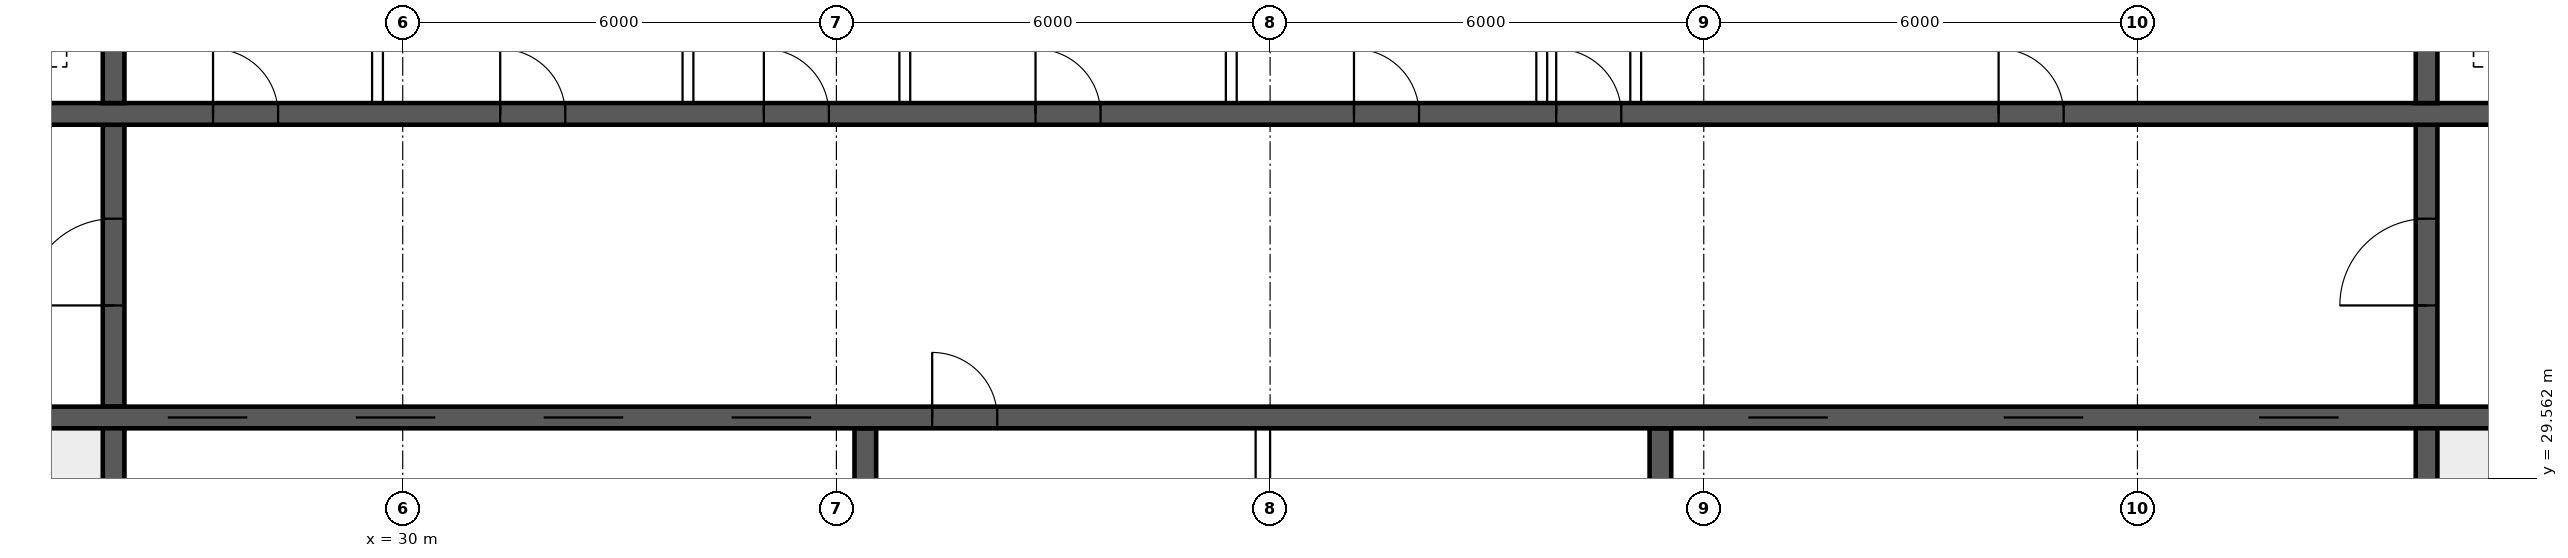
"""IFC4 building model, lengths in metres.
Left out: names, types, materials, properties, quantities, classifications, styles, units other than length and angle.
Written with IfcOpenShell. Run it as: python <this file> out.ifc"""

import sys

from ifc_helpers import new_model, si_unit, direction, frame, frame_2d, origin, place, context, subcontext, project, spatial, rectangle, extrude, element, fill, save


model = new_model("IFC4")
c1 = context("Model", 3, precision=1e-05, world=origin(), true_north=direction((0.0, 1.0)))
c2 = subcontext(c1, "Body", "Model", "MODEL_VIEW")
j1 = project(units=[si_unit("LENGTHUNIT", "METRE"), si_unit("PLANEANGLEUNIT", "RADIAN")], contexts=[c1])
p1 = place(None, origin())
s1 = spatial("IfcSite", under=j1, at=p1, CompositionType="ELEMENT")
p2 = place(p1, origin())
s2 = spatial("IfcBuilding", under=s1, at=p2, CompositionType="ELEMENT")
p3 = place(p2, frame((0.0, 0.0, 178.6)))
s3 = spatial("IfcBuildingStorey", under=s2, at=p3, CompositionType="ELEMENT", Elevation=178.6)
p4 = place(p3, frame((18.425, 30.4, 0.0), z_axis=(0.0, 0.0, 1.0), x_axis=(1.0, 0.0, 0.0)))
e1 = element("IfcWall", 1, at=p4, inside=s3, PredefinedType="SHEAR", context=c2, shape_type="SweptSolid", body=[
    extrude(rectangle(XDim=47.15, YDim=0.3, at=frame_2d((23.575, 0.0))), origin(), (0.0, 0.0, 1.0), 3.75),
])
p5 = place(p4, frame((0.4, 0.0, 0.0)))
e2 = element("IfcOpeningElement", 2, at=p5, cuts=e1, PredefinedType="OPENING", context=c2, shape_type="SweptSolid", body=[
    extrude(rectangle(XDim=1.0, YDim=2.1, at=frame_2d((0.5, 1.05))), frame((0.0, 0.16, 0.0), z_axis=(0.0, -1.0, 0.0), x_axis=(1.0, 0.0, 0.0)), (0.0, 0.0, 1.0), 0.32),
])
p6 = place(p4, frame((45.75, 0.0, 0.0)))
e3 = element("IfcOpeningElement", 3, at=p6, cuts=e1, PredefinedType="OPENING", context=c2, shape_type="SweptSolid", body=[
    extrude(rectangle(XDim=1.0, YDim=2.1, at=frame_2d((0.5, 1.05))), frame((0.0, 0.16, 0.0), z_axis=(0.0, -1.0, 0.0), x_axis=(1.0, 0.0, 0.0)), (0.0, 0.0, 1.0), 0.32),
])
p7 = place(p4, frame((8.325, 0.0, 0.0)))
e4 = element("IfcOpeningElement", 4, at=p7, cuts=e1, PredefinedType="OPENING", context=c2, shape_type="SweptSolid", body=[
    extrude(rectangle(XDim=1.1, YDim=2.1, at=frame_2d((0.55, 1.05))), frame((0.0, 0.16, 0.0), z_axis=(0.0, -1.0, 0.0), x_axis=(1.0, 0.0, 0.0)), (0.0, 0.0, 1.0), 0.32),
])
p8 = place(p4, frame((10.925, 0.0, 0.0)))
e5 = element("IfcOpeningElement", 5, at=p8, cuts=e1, PredefinedType="OPENING", context=c2, shape_type="SweptSolid", body=[
    extrude(rectangle(XDim=1.1, YDim=2.1, at=frame_2d((0.55, 1.05))), frame((0.0, 0.16, 0.0), z_axis=(0.0, -1.0, 0.0), x_axis=(1.0, 0.0, 0.0)), (0.0, 0.0, 1.0), 0.32),
])
p9 = place(p4, frame((13.525, 0.0, 0.0)))
e6 = element("IfcOpeningElement", 6, at=p9, cuts=e1, PredefinedType="OPENING", context=c2, shape_type="SweptSolid", body=[
    extrude(rectangle(XDim=1.1, YDim=2.1, at=frame_2d((0.55, 1.05))), frame((0.0, 0.16, 0.0), z_axis=(0.0, -1.0, 0.0), x_axis=(1.0, 0.0, 0.0)), (0.0, 0.0, 1.0), 0.32),
])
p10 = place(p4, frame((16.125, 0.0, 0.0)))
e7 = element("IfcOpeningElement", 7, at=p10, cuts=e1, PredefinedType="OPENING", context=c2, shape_type="SweptSolid", body=[
    extrude(rectangle(XDim=1.1, YDim=2.1, at=frame_2d((0.55, 1.05))), frame((0.0, 0.16, 0.0), z_axis=(0.0, -1.0, 0.0), x_axis=(1.0, 0.0, 0.0)), (0.0, 0.0, 1.0), 0.32),
])
p11 = place(p4, frame((18.9, 0.0, 0.0)))
e8 = element("IfcOpeningElement", 8, at=p11, cuts=e1, PredefinedType="OPENING", context=c2, shape_type="SweptSolid", body=[
    extrude(rectangle(XDim=0.9, YDim=2.1, at=frame_2d((0.45, 1.05))), frame((0.0, 0.16, 0.0), z_axis=(0.0, -1.0, 0.0), x_axis=(1.0, 0.0, 0.0)), (0.0, 0.0, 1.0), 0.32),
])
p12 = place(p4, frame((30.192, 0.0, 0.0)))
e9 = element("IfcOpeningElement", 9, at=p12, cuts=e1, PredefinedType="OPENING", context=c2, shape_type="SweptSolid", body=[
    extrude(rectangle(XDim=1.1, YDim=2.1, at=frame_2d((0.55, 1.05))), frame((0.0, 0.16, 0.0), z_axis=(0.0, -1.0, 0.0), x_axis=(1.0, 0.0, 0.0)), (0.0, 0.0, 1.0), 0.32),
])
p13 = place(p4, frame((33.725, 0.0, 0.0)))
e10 = element("IfcOpeningElement", 10, at=p13, cuts=e1, PredefinedType="OPENING", context=c2, shape_type="SweptSolid", body=[
    extrude(rectangle(XDim=1.1, YDim=2.1, at=frame_2d((0.55, 1.05))), frame((0.0, 0.16, 0.0), z_axis=(0.0, -1.0, 0.0), x_axis=(1.0, 0.0, 0.0)), (0.0, 0.0, 1.0), 0.32),
])
p14 = place(p4, frame((37.258, 0.0, 0.0)))
e11 = element("IfcOpeningElement", 11, at=p14, cuts=e1, PredefinedType="OPENING", context=c2, shape_type="SweptSolid", body=[
    extrude(rectangle(XDim=1.1, YDim=2.1, at=frame_2d((0.55, 1.05))), frame((0.0, 0.16, 0.0), z_axis=(0.0, -1.0, 0.0), x_axis=(1.0, 0.0, 0.0)), (0.0, 0.0, 1.0), 0.32),
])
p15 = place(p3, frame((18.425, 34.6, 0.0), z_axis=(0.0, 0.0, 1.0), x_axis=(1.0, 0.0, 0.0)))
e12 = element("IfcWall", 12, at=p15, inside=s3, PredefinedType="SHEAR", context=c2, shape_type="SweptSolid", body=[
    extrude(rectangle(XDim=47.15, YDim=0.3, at=frame_2d((23.575, 0.0))), origin(), (0.0, 0.0, 1.0), 3.75),
])
p16 = place(p15, frame((0.9, 0.0, 0.0)))
e13 = element("IfcOpeningElement", 13, at=p16, cuts=e12, PredefinedType="OPENING", context=c2, shape_type="SweptSolid", body=[
    extrude(rectangle(XDim=1.1, YDim=2.1, at=frame_2d((0.55, 1.05))), frame((0.0, 0.16, 0.0), z_axis=(0.0, -1.0, 0.0), x_axis=(1.0, 0.0, 0.0)), (0.0, 0.0, 1.0), 0.32),
])
p17 = place(p15, frame((45.15, 0.0, 0.0)))
e14 = element("IfcOpeningElement", 14, at=p17, cuts=e12, PredefinedType="OPENING", context=c2, shape_type="SweptSolid", body=[
    extrude(rectangle(XDim=1.1, YDim=2.1, at=frame_2d((0.55, 1.05))), frame((0.0, 0.16, 0.0), z_axis=(0.0, -1.0, 0.0), x_axis=(1.0, 0.0, 0.0)), (0.0, 0.0, 1.0), 0.32),
])
p18 = place(p15, frame((4.175, 0.0, 0.0)))
e15 = element("IfcOpeningElement", 15, at=p18, cuts=e12, PredefinedType="OPENING", context=c2, shape_type="SweptSolid", body=[
    extrude(rectangle(XDim=0.9, YDim=2.1, at=frame_2d((0.45, 1.05))), frame((0.0, 0.16, 0.0), z_axis=(0.0, -1.0, 0.0), x_axis=(1.0, 0.0, 0.0)), (0.0, 0.0, 1.0), 0.32),
])
p19 = place(p15, frame((42.075, 0.0, 0.0)))
e16 = element("IfcOpeningElement", 16, at=p19, cuts=e12, PredefinedType="OPENING", context=c2, shape_type="SweptSolid", body=[
    extrude(rectangle(XDim=0.9, YDim=2.1, at=frame_2d((0.45, 1.05))), frame((0.0, 0.16, 0.0), z_axis=(0.0, -1.0, 0.0), x_axis=(1.0, 0.0, 0.0)), (0.0, 0.0, 1.0), 0.32),
])
p20 = place(p15, frame((8.95, 0.0, 0.0)))
e17 = element("IfcOpeningElement", 17, at=p20, cuts=e12, PredefinedType="OPENING", context=c2, shape_type="SweptSolid", body=[
    extrude(rectangle(XDim=0.9, YDim=2.1, at=frame_2d((0.45, 1.05))), frame((0.0, 0.16, 0.0), z_axis=(0.0, -1.0, 0.0), x_axis=(1.0, 0.0, 0.0)), (0.0, 0.0, 1.0), 0.32),
])
p21 = place(p15, frame((12.924, 0.0, 0.0)))
e18 = element("IfcOpeningElement", 18, at=p21, cuts=e12, PredefinedType="OPENING", context=c2, shape_type="SweptSolid", body=[
    extrude(rectangle(XDim=0.9, YDim=2.1, at=frame_2d((0.45, 1.05))), frame((0.0, 0.16, 0.0), z_axis=(0.0, -1.0, 0.0), x_axis=(1.0, 0.0, 0.0)), (0.0, 0.0, 1.0), 0.32),
])
p22 = place(p15, frame((16.571, 0.0, 0.0)))
e19 = element("IfcOpeningElement", 19, at=p22, cuts=e12, PredefinedType="OPENING", context=c2, shape_type="SweptSolid", body=[
    extrude(rectangle(XDim=0.9, YDim=2.1, at=frame_2d((0.45, 1.05))), frame((0.0, 0.16, 0.0), z_axis=(0.0, -1.0, 0.0), x_axis=(1.0, 0.0, 0.0)), (0.0, 0.0, 1.0), 0.32),
])
p23 = place(p15, frame((20.33, 0.0, 0.0)))
e20 = element("IfcOpeningElement", 20, at=p23, cuts=e12, PredefinedType="OPENING", context=c2, shape_type="SweptSolid", body=[
    extrude(rectangle(XDim=0.9, YDim=2.1, at=frame_2d((0.45, 1.05))), frame((0.0, 0.16, 0.0), z_axis=(0.0, -1.0, 0.0), x_axis=(1.0, 0.0, 0.0)), (0.0, 0.0, 1.0), 0.32),
])
p24 = place(p15, frame((24.736, 0.0, 0.0)))
e21 = element("IfcOpeningElement", 21, at=p24, cuts=e12, PredefinedType="OPENING", context=c2, shape_type="SweptSolid", body=[
    extrude(rectangle(XDim=0.9, YDim=2.1, at=frame_2d((0.45, 1.05))), frame((0.0, 0.16, 0.0), z_axis=(0.0, -1.0, 0.0), x_axis=(1.0, 0.0, 0.0)), (0.0, 0.0, 1.0), 0.32),
])
p25 = place(p15, frame((27.533, 0.0, 0.0)))
e22 = element("IfcOpeningElement", 22, at=p25, cuts=e12, PredefinedType="OPENING", context=c2, shape_type="SweptSolid", body=[
    extrude(rectangle(XDim=0.9, YDim=2.1, at=frame_2d((0.45, 1.05))), frame((0.0, 0.16, 0.0), z_axis=(0.0, -1.0, 0.0), x_axis=(1.0, 0.0, 0.0)), (0.0, 0.0, 1.0), 0.32),
])
p26 = place(p15, frame((33.654, 0.0, 0.0)))
e23 = element("IfcOpeningElement", 23, at=p26, cuts=e12, PredefinedType="OPENING", context=c2, shape_type="SweptSolid", body=[
    extrude(rectangle(XDim=0.9, YDim=2.1, at=frame_2d((0.45, 1.05))), frame((0.0, 0.16, 0.0), z_axis=(0.0, -1.0, 0.0), x_axis=(1.0, 0.0, 0.0)), (0.0, 0.0, 1.0), 0.32),
])
for number, where, z_axis, x_axis in (
    (24, (26.0, 26.225, 0.0), (0.0, 0.0, 1.0), (0.0, 1.0, 0.0)),
    (25, (58.0, 26.225, 0.0), (0.0, 0.0, 1.0), (0.0, 1.0, 0.0)),
):
    element("IfcWall", number, at=place(p3, frame(where, z_axis=z_axis, x_axis=x_axis)), inside=s3, PredefinedType="SHEAR", context=c2, shape_type="SweptSolid", body=[
        extrude(rectangle(XDim=4.025, YDim=0.3, at=frame_2d((2.012, 0.0))), origin(), (0.0, 0.0, 1.0), 3.75),
    ])
p27 = place(p3, frame((26.0, 30.55, 0.0), z_axis=(0.0, 0.0, 1.0), x_axis=(0.0, 1.0, 0.0)))
e26 = element("IfcWall", 26, at=p27, inside=s3, PredefinedType="SHEAR", context=c2, shape_type="SweptSolid", body=[
    extrude(rectangle(XDim=3.9, YDim=0.3, at=frame_2d((1.95, 0.0))), origin(), (0.0, 0.0, 1.0), 3.75),
])
p28 = place(p27, frame((1.4, 0.0, 0.0)))
e27 = element("IfcOpeningElement", 27, at=p28, cuts=e26, PredefinedType="OPENING", context=c2, shape_type="SweptSolid", body=[
    extrude(rectangle(XDim=1.2, YDim=2.1, at=frame_2d((0.6, 1.05))), frame((0.0, 0.16, 0.0), z_axis=(0.0, -1.0, 0.0), x_axis=(1.0, 0.0, 0.0)), (0.0, 0.0, 1.0), 0.32),
])
p29 = place(p3, frame((58.0, 30.55, 0.0), z_axis=(0.0, 0.0, 1.0), x_axis=(0.0, 1.0, 0.0)))
e28 = element("IfcWall", 28, at=p29, inside=s3, PredefinedType="SHEAR", context=c2, shape_type="SweptSolid", body=[
    extrude(rectangle(XDim=3.9, YDim=0.3, at=frame_2d((1.95, 0.0))), origin(), (0.0, 0.0, 1.0), 3.75),
])
p30 = place(p29, frame((1.4, 0.0, 0.0)))
e29 = element("IfcOpeningElement", 29, at=p30, cuts=e28, PredefinedType="OPENING", context=c2, shape_type="SweptSolid", body=[
    extrude(rectangle(XDim=1.2, YDim=2.1, at=frame_2d((0.6, 1.05))), frame((0.0, 0.16, 0.0), z_axis=(0.0, -1.0, 0.0), x_axis=(1.0, 0.0, 0.0)), (0.0, 0.0, 1.0), 0.32),
])
for number, where, z_axis, x_axis in (
    (30, (26.0, 34.75, 0.0), (0.0, 0.0, 1.0), (0.0, 1.0, 0.0)),
    (31, (58.0, 34.75, 0.0), (0.0, 0.0, 1.0), (0.0, 1.0, 0.0)),
):
    element("IfcWall", number, at=place(p3, frame(where, z_axis=z_axis, x_axis=x_axis)), inside=s3, PredefinedType="SHEAR", context=c2, shape_type="SweptSolid", body=[
        extrude(rectangle(XDim=3.025, YDim=0.3, at=frame_2d((1.512, 0.0))), origin(), (0.0, 0.0, 1.0), 3.75),
    ])
for number, where, z_axis, x_axis in (
    (32, (36.4, 26.225, 0.0), (0.0, 0.0, 1.0), (0.0, 1.0, 0.0)),
    (33, (47.4, 26.225, 0.0), (0.0, 0.0, 1.0), (0.0, 1.0, 0.0)),
):
    element("IfcWall", number, at=place(p3, frame(where, z_axis=z_axis, x_axis=x_axis)), inside=s3, PredefinedType="SHEAR", context=c2, shape_type="SweptSolid", body=[
        extrude(rectangle(XDim=4.025, YDim=0.3, at=frame_2d((2.012, 0.0))), origin(), (0.0, 0.0, 1.0), 3.75),
    ])
for number, where, z_axis, x_axis in (
    (34, (29.651, 34.75, 0.0), (0.0, 0.0, 1.0), (0.0, 1.0, 0.0)),
    (35, (33.946, 34.75, 0.0), (0.0, 0.0, 1.0), (0.0, 1.0, 0.0)),
    (36, (36.946, 34.75, 0.0), (0.0, 0.0, 1.0), (0.0, 1.0, 0.0)),
    (37, (41.463, 34.75, 0.0), (0.0, 0.0, 1.0), (0.0, 1.0, 0.0)),
    (38, (45.758, 34.75, 0.0), (0.0, 0.0, 1.0), (0.0, 1.0, 0.0)),
    (39, (47.058, 34.75, 0.0), (0.0, 0.0, 1.0), (0.0, 1.0, 0.0)),
):
    element("IfcWall", number, at=place(p3, frame(where, z_axis=z_axis, x_axis=x_axis)), inside=s3, PredefinedType="SOLIDWALL", context=c2, shape_type="SweptSolid", body=[
        extrude(rectangle(XDim=3.025, YDim=0.15, at=frame_2d((1.512, 0.0))), origin(), (0.0, 0.0, 1.0), 3.5),
    ])
p31 = place(p3, frame((41.9, 26.225, 0.0), z_axis=(0.0, 0.0, 1.0), x_axis=(0.0, 1.0, 0.0)))
e40 = element("IfcWall", 40, at=p31, inside=s3, PredefinedType="SOLIDWALL", context=c2, shape_type="SweptSolid", body=[
    extrude(rectangle(XDim=4.025, YDim=0.2, at=frame_2d((2.012, 0.0))), origin(), (0.0, 0.0, 1.0), 3.5),
])
p32 = place(p28, origin())
e41 = element("IfcDoor", 41, at=p32, inside=s3, OperationType="SINGLE_SWING_LEFT", PredefinedType="DOOR", context=c2, shape_type="SweptSolid", body=[
    extrude(rectangle(XDim=1.2, YDim=2.1, at=frame_2d((0.6, 1.05))), frame((0.0, 0.025, 0.0), z_axis=(0.0, -1.0, 0.0), x_axis=(1.0, 0.0, 0.0)), (0.0, 0.0, 1.0), 0.05),
])
fill(e27, e41)
p33 = place(p30, origin())
e42 = element("IfcDoor", 42, at=p33, inside=s3, OperationType="SINGLE_SWING_LEFT", PredefinedType="DOOR", context=c2, shape_type="SweptSolid", body=[
    extrude(rectangle(XDim=1.2, YDim=2.1, at=frame_2d((0.6, 1.05))), frame((0.0, 0.025, 0.0), z_axis=(0.0, -1.0, 0.0), x_axis=(1.0, 0.0, 0.0)), (0.0, 0.0, 1.0), 0.05),
])
fill(e29, e42)
p34 = place(p20, origin())
e43 = element("IfcDoor", 43, at=p34, inside=s3, OperationType="SINGLE_SWING_LEFT", PredefinedType="DOOR", context=c2, shape_type="SweptSolid", body=[
    extrude(rectangle(XDim=0.9, YDim=2.1, at=frame_2d((0.45, 1.05))), frame((0.0, 0.025, 0.0), z_axis=(0.0, -1.0, 0.0), x_axis=(1.0, 0.0, 0.0)), (0.0, 0.0, 1.0), 0.05),
])
fill(e17, e43)
p35 = place(p21, origin())
e44 = element("IfcDoor", 44, at=p35, inside=s3, OperationType="SINGLE_SWING_LEFT", PredefinedType="DOOR", context=c2, shape_type="SweptSolid", body=[
    extrude(rectangle(XDim=0.9, YDim=2.1, at=frame_2d((0.45, 1.05))), frame((0.0, 0.025, 0.0), z_axis=(0.0, -1.0, 0.0), x_axis=(1.0, 0.0, 0.0)), (0.0, 0.0, 1.0), 0.05),
])
fill(e18, e44)
p36 = place(p22, origin())
e45 = element("IfcDoor", 45, at=p36, inside=s3, OperationType="SINGLE_SWING_LEFT", PredefinedType="DOOR", context=c2, shape_type="SweptSolid", body=[
    extrude(rectangle(XDim=0.9, YDim=2.1, at=frame_2d((0.45, 1.05))), frame((0.0, 0.025, 0.0), z_axis=(0.0, -1.0, 0.0), x_axis=(1.0, 0.0, 0.0)), (0.0, 0.0, 1.0), 0.05),
])
fill(e19, e45)
p37 = place(p23, origin())
e46 = element("IfcDoor", 46, at=p37, inside=s3, OperationType="SINGLE_SWING_LEFT", PredefinedType="DOOR", context=c2, shape_type="SweptSolid", body=[
    extrude(rectangle(XDim=0.9, YDim=2.1, at=frame_2d((0.45, 1.05))), frame((0.0, 0.025, 0.0), z_axis=(0.0, -1.0, 0.0), x_axis=(1.0, 0.0, 0.0)), (0.0, 0.0, 1.0), 0.05),
])
fill(e20, e46)
p38 = place(p24, origin())
e47 = element("IfcDoor", 47, at=p38, inside=s3, OperationType="SINGLE_SWING_LEFT", PredefinedType="DOOR", context=c2, shape_type="SweptSolid", body=[
    extrude(rectangle(XDim=0.9, YDim=2.1, at=frame_2d((0.45, 1.05))), frame((0.0, 0.025, 0.0), z_axis=(0.0, -1.0, 0.0), x_axis=(1.0, 0.0, 0.0)), (0.0, 0.0, 1.0), 0.05),
])
fill(e21, e47)
p39 = place(p25, origin())
e48 = element("IfcDoor", 48, at=p39, inside=s3, OperationType="SINGLE_SWING_LEFT", PredefinedType="DOOR", context=c2, shape_type="SweptSolid", body=[
    extrude(rectangle(XDim=0.9, YDim=2.1, at=frame_2d((0.45, 1.05))), frame((0.0, 0.025, 0.0), z_axis=(0.0, -1.0, 0.0), x_axis=(1.0, 0.0, 0.0)), (0.0, 0.0, 1.0), 0.05),
])
fill(e22, e48)
p40 = place(p26, origin())
e49 = element("IfcDoor", 49, at=p40, inside=s3, OperationType="SINGLE_SWING_LEFT", PredefinedType="DOOR", context=c2, shape_type="SweptSolid", body=[
    extrude(rectangle(XDim=0.9, YDim=2.1, at=frame_2d((0.45, 1.05))), frame((0.0, 0.025, 0.0), z_axis=(0.0, -1.0, 0.0), x_axis=(1.0, 0.0, 0.0)), (0.0, 0.0, 1.0), 0.05),
])
fill(e23, e49)
p41 = place(p7, origin())
e50 = element("IfcDoor", 50, at=p41, inside=s3, OperationType="DOUBLE_DOOR_SLIDING", PredefinedType="DOOR", context=c2, shape_type="SweptSolid", body=[
    extrude(rectangle(XDim=1.1, YDim=2.1, at=frame_2d((0.55, 1.05))), frame((0.0, 0.025, 0.0), z_axis=(0.0, -1.0, 0.0), x_axis=(1.0, 0.0, 0.0)), (0.0, 0.0, 1.0), 0.05),
])
fill(e4, e50)
p42 = place(p8, origin())
e51 = element("IfcDoor", 51, at=p42, inside=s3, OperationType="DOUBLE_DOOR_SLIDING", PredefinedType="DOOR", context=c2, shape_type="SweptSolid", body=[
    extrude(rectangle(XDim=1.1, YDim=2.1, at=frame_2d((0.55, 1.05))), frame((0.0, 0.025, 0.0), z_axis=(0.0, -1.0, 0.0), x_axis=(1.0, 0.0, 0.0)), (0.0, 0.0, 1.0), 0.05),
])
fill(e5, e51)
p43 = place(p9, origin())
e52 = element("IfcDoor", 52, at=p43, inside=s3, OperationType="DOUBLE_DOOR_SLIDING", PredefinedType="DOOR", context=c2, shape_type="SweptSolid", body=[
    extrude(rectangle(XDim=1.1, YDim=2.1, at=frame_2d((0.55, 1.05))), frame((0.0, 0.025, 0.0), z_axis=(0.0, -1.0, 0.0), x_axis=(1.0, 0.0, 0.0)), (0.0, 0.0, 1.0), 0.05),
])
fill(e6, e52)
p44 = place(p10, origin())
e53 = element("IfcDoor", 53, at=p44, inside=s3, OperationType="DOUBLE_DOOR_SLIDING", PredefinedType="DOOR", context=c2, shape_type="SweptSolid", body=[
    extrude(rectangle(XDim=1.1, YDim=2.1, at=frame_2d((0.55, 1.05))), frame((0.0, 0.025, 0.0), z_axis=(0.0, -1.0, 0.0), x_axis=(1.0, 0.0, 0.0)), (0.0, 0.0, 1.0), 0.05),
])
fill(e7, e53)
p45 = place(p11, origin())
e54 = element("IfcDoor", 54, at=p45, inside=s3, OperationType="SINGLE_SWING_LEFT", PredefinedType="DOOR", context=c2, shape_type="SweptSolid", body=[
    extrude(rectangle(XDim=0.9, YDim=2.1, at=frame_2d((0.45, 1.05))), frame((0.0, 0.025, 0.0), z_axis=(0.0, -1.0, 0.0), x_axis=(1.0, 0.0, 0.0)), (0.0, 0.0, 1.0), 0.05),
])
fill(e8, e54)
p46 = place(p12, origin())
e55 = element("IfcDoor", 55, at=p46, inside=s3, OperationType="DOUBLE_DOOR_SLIDING", PredefinedType="DOOR", context=c2, shape_type="SweptSolid", body=[
    extrude(rectangle(XDim=1.1, YDim=2.1, at=frame_2d((0.55, 1.05))), frame((0.0, 0.025, 0.0), z_axis=(0.0, -1.0, 0.0), x_axis=(1.0, 0.0, 0.0)), (0.0, 0.0, 1.0), 0.05),
])
fill(e9, e55)
p47 = place(p13, origin())
e56 = element("IfcDoor", 56, at=p47, inside=s3, OperationType="DOUBLE_DOOR_SLIDING", PredefinedType="DOOR", context=c2, shape_type="SweptSolid", body=[
    extrude(rectangle(XDim=1.1, YDim=2.1, at=frame_2d((0.55, 1.05))), frame((0.0, 0.025, 0.0), z_axis=(0.0, -1.0, 0.0), x_axis=(1.0, 0.0, 0.0)), (0.0, 0.0, 1.0), 0.05),
])
fill(e10, e56)
p48 = place(p14, origin())
e57 = element("IfcDoor", 57, at=p48, inside=s3, OperationType="DOUBLE_DOOR_SLIDING", PredefinedType="DOOR", context=c2, shape_type="SweptSolid", body=[
    extrude(rectangle(XDim=1.1, YDim=2.1, at=frame_2d((0.55, 1.05))), frame((0.0, 0.025, 0.0), z_axis=(0.0, -1.0, 0.0), x_axis=(1.0, 0.0, 0.0)), (0.0, 0.0, 1.0), 0.05),
])
fill(e11, e57)
save(model, sys.argv[1])
